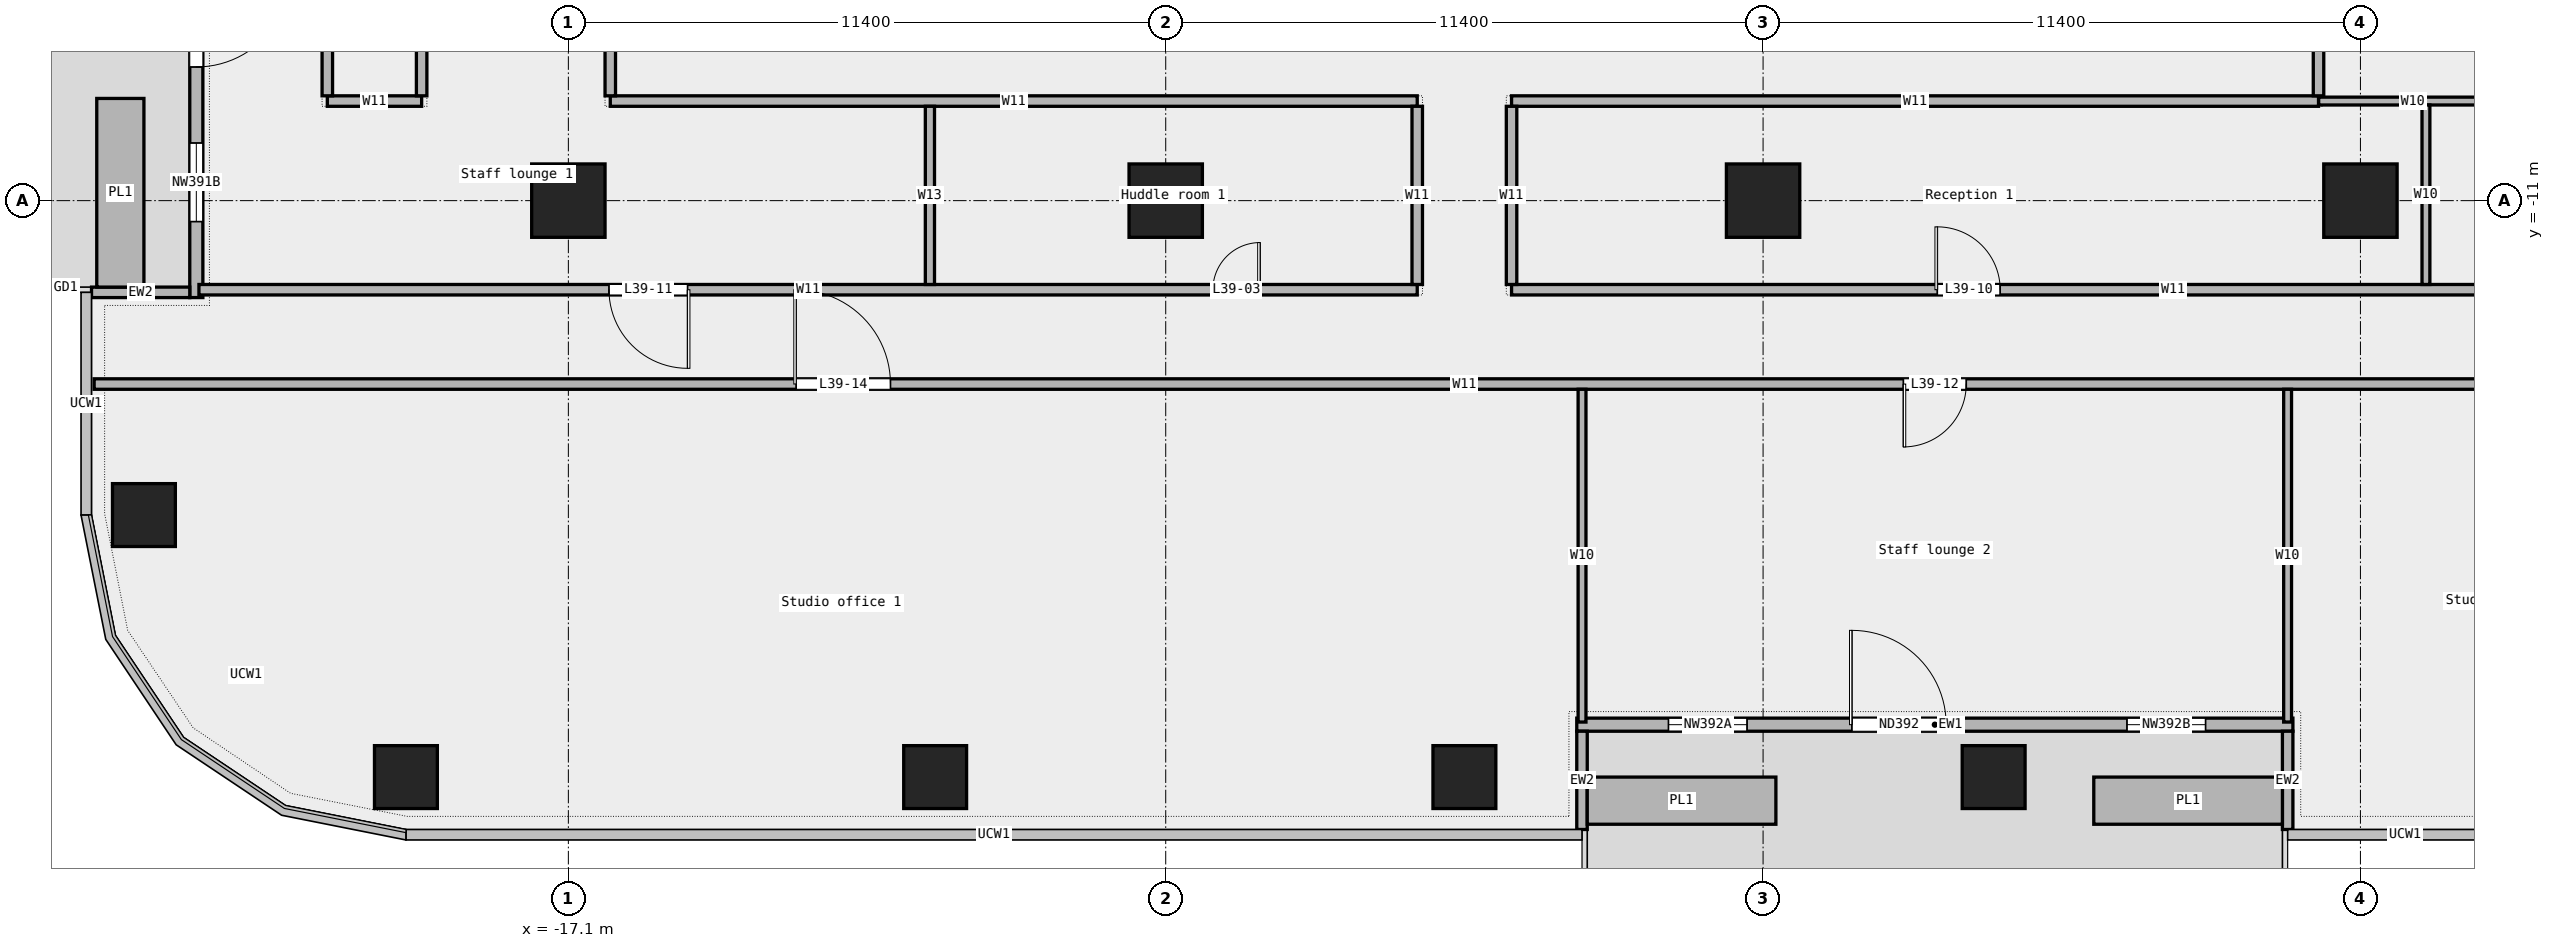
"""IFC4 building model, lengths in metres.
Left out: names, types, materials, properties, quantities, classifications, styles, units other than length and angle.
Written with IfcOpenShell. Run it as: python <this file> out.ifc"""

import sys

from ifc_helpers import new_model, si_unit, direction, frame, frame_2d, origin, origin_2d, place, context, subcontext, project, spatial, rectangle, extrude, element, fill, save


model = new_model("IFC4")
c1 = context("Model", 3, precision=1e-05, world=origin(), true_north=direction((0.0, 1.0)))
c2 = subcontext(c1, "Body", "Model", "MODEL_VIEW")
j1 = project(units=[si_unit("LENGTHUNIT", "METRE"), si_unit("PLANEANGLEUNIT", "RADIAN")], contexts=[c1])
p1 = place(None, origin())
s1 = spatial("IfcSite", under=j1, at=p1, CompositionType="ELEMENT")
p2 = place(p1, origin())
s2 = spatial("IfcBuilding", under=s1, at=p2, CompositionType="ELEMENT")
p3 = place(p2, frame((0.0, 0.0, 189.0)))
s3 = spatial("IfcBuildingStorey", under=s2, at=p3, CompositionType="ELEMENT", Elevation=189.0)
for number, where, z_axis, x_axis in (
    (1, (-20.2, -22.0, 0.0), (0.0, 0.0, 1.0), (1.0, 0.0, 0.0)),
    (2, (-10.1, -22.0, 0.0), (0.0, 0.0, 1.0), (1.0, 0.0, 0.0)),
    (3, (0.0, -22.0, 0.0), (0.0, 0.0, 1.0), (1.0, 0.0, 0.0)),
    (4, (10.1, -22.0, 0.0), (0.0, 0.0, 1.0), (1.0, 0.0, 0.0)),
    (5, (-25.2, -17.0, 0.0), (0.0, 0.0, 1.0), (1.0, 0.0, 0.0)),
):
    element("IfcColumn", number, at=place(p3, frame(where, z_axis=z_axis, x_axis=x_axis)), inside=s3, PredefinedType="COLUMN", context=c2, shape_type="SweptSolid", body=[
        extrude(rectangle(XDim=1.2, YDim=1.2, at=origin_2d()), origin(), (0.0, 0.0, 1.0), 3.6),
    ])
for number, where, z_axis, x_axis in (
    (6, (-17.1, -11.0, 0.0), (0.0, 0.0, 1.0), (1.0, 0.0, 0.0)),
    (7, (-5.7, -11.0, 0.0), (0.0, 0.0, 1.0), (1.0, 0.0, 0.0)),
    (8, (5.7, -11.0, 0.0), (0.0, 0.0, 1.0), (1.0, 0.0, 0.0)),
    (9, (17.1, -11.0, 0.0), (0.0, 0.0, 1.0), (1.0, 0.0, 0.0)),
):
    element("IfcColumn", number, at=place(p3, frame(where, z_axis=z_axis, x_axis=x_axis)), inside=s3, PredefinedType="COLUMN", context=c2, shape_type="SweptSolid", body=[
        extrude(rectangle(XDim=1.4, YDim=1.4, at=origin_2d()), origin(), (0.0, 0.0, 1.0), 3.6),
    ])
p4 = place(p3, frame((-24.2, 0.1, 0.0), z_axis=(0.0, 0.0, 1.0), x_axis=(0.0, -1.0, 0.0)))
e10 = element("IfcWall", 10, at=p4, inside=s3, PredefinedType="STANDARD", context=c2, shape_type="SweptSolid", body=[
    extrude(rectangle(XDim=12.95, YDim=0.25, at=frame_2d((6.475, 0.0))), origin(), (0.0, 0.0, 1.0), 3.6),
])
p5 = place(p4, frame((1.5, 0.0, 0.45)))
e11 = element("IfcOpeningElement", 11, at=p5, cuts=e10, PredefinedType="OPENING", context=c2, shape_type="SweptSolid", body=[
    extrude(rectangle(XDim=1.5, YDim=2.4, at=frame_2d((0.75, 1.2))), frame((0.0, 0.137, 0.0), z_axis=(0.0, -1.0, 0.0), x_axis=(1.0, 0.0, 0.0)), (0.0, 0.0, 1.0), 0.274),
])
p6 = place(p4, frame((6.75, 0.0, 0.0)))
e12 = element("IfcOpeningElement", 12, at=p6, cuts=e10, PredefinedType="OPENING", context=c2, shape_type="SweptSolid", body=[
    extrude(rectangle(XDim=1.8, YDim=2.4, at=frame_2d((0.9, 1.2))), frame((0.0, 0.137, 0.0), z_axis=(0.0, -1.0, 0.0), x_axis=(1.0, 0.0, 0.0)), (0.0, 0.0, 1.0), 0.274),
])
p7 = place(p4, frame((10.0, 0.0, 0.45)))
e13 = element("IfcOpeningElement", 13, at=p7, cuts=e10, PredefinedType="OPENING", context=c2, shape_type="SweptSolid", body=[
    extrude(rectangle(XDim=1.5, YDim=2.4, at=frame_2d((0.75, 1.2))), frame((0.0, 0.137, 0.0), z_axis=(0.0, -1.0, 0.0), x_axis=(1.0, 0.0, 0.0)), (0.0, 0.0, 1.0), 0.274),
])
p8 = place(p3, frame((-26.2, -12.75, 0.0), z_axis=(0.0, 0.0, 1.0), x_axis=(1.0, 0.0, 0.0)))
e14 = element("IfcWall", 14, at=p8, inside=s3, PredefinedType="STANDARD", context=c2, shape_type="SweptSolid", body=[
    extrude(rectangle(XDim=1.875, YDim=0.2, at=frame_2d((0.938, 0.0))), origin(), (0.0, 0.0, 1.0), 3.6),
])
p9 = place(p3, frame((-25.65, -9.05, 0.0), z_axis=(0.0, 0.0, 1.0), x_axis=(0.0, -1.0, 0.0)))
e15 = element("IfcWall", 15, at=p9, inside=s3, PredefinedType="STANDARD", context=c2, shape_type="SweptSolid", body=[
    extrude(rectangle(XDim=3.6, YDim=0.9, at=frame_2d((1.8, 0.0))), origin(), (0.0, 0.0, 1.0), 0.7),
])
p10 = place(p3, frame((2.145, -21.0, 0.0), z_axis=(0.0, 0.0, 1.0), x_axis=(1.0, 0.0, 0.0)))
e16 = element("IfcWall", 16, at=p10, inside=s3, PredefinedType="STANDARD", context=c2, shape_type="SweptSolid", body=[
    extrude(rectangle(XDim=13.667, YDim=0.25, at=frame_2d((6.833, 0.0))), origin(), (0.0, 0.0, 1.0), 3.6),
])
p11 = place(p10, frame((1.75, 0.0, 0.45)))
e17 = element("IfcOpeningElement", 17, at=p11, cuts=e16, PredefinedType="OPENING", context=c2, shape_type="SweptSolid", body=[
    extrude(rectangle(XDim=1.5, YDim=2.4, at=frame_2d((0.75, 1.2))), frame((0.0, 0.137, 0.0), z_axis=(0.0, -1.0, 0.0), x_axis=(1.0, 0.0, 0.0)), (0.0, 0.0, 1.0), 0.274),
])
p12 = place(p10, frame((5.25, 0.0, 0.0)))
e18 = element("IfcOpeningElement", 18, at=p12, cuts=e16, PredefinedType="OPENING", context=c2, shape_type="SweptSolid", body=[
    extrude(rectangle(XDim=1.8, YDim=2.4, at=frame_2d((0.9, 1.2))), frame((0.0, 0.137, 0.0), z_axis=(0.0, -1.0, 0.0), x_axis=(1.0, 0.0, 0.0)), (0.0, 0.0, 1.0), 0.274),
])
p13 = place(p10, frame((10.5, 0.0, 0.45)))
e19 = element("IfcOpeningElement", 19, at=p13, cuts=e16, PredefinedType="OPENING", context=c2, shape_type="SweptSolid", body=[
    extrude(rectangle(XDim=1.5, YDim=2.4, at=frame_2d((0.75, 1.2))), frame((0.0, 0.137, 0.0), z_axis=(0.0, -1.0, 0.0), x_axis=(1.0, 0.0, 0.0)), (0.0, 0.0, 1.0), 0.274),
])
for number, where, z_axis, x_axis in (
    (20, (2.244, -23.0, 0.0), (0.0, 0.0, 1.0), (0.0, 1.0, 0.0)),
    (21, (15.711, -23.0, 0.0), (0.0, 0.0, 1.0), (0.0, 1.0, 0.0)),
):
    element("IfcWall", number, at=place(p3, frame(where, z_axis=z_axis, x_axis=x_axis)), inside=s3, PredefinedType="STANDARD", context=c2, shape_type="SweptSolid", body=[
        extrude(rectangle(XDim=1.875, YDim=0.2, at=frame_2d((0.938, 0.0))), origin(), (0.0, 0.0, 1.0), 3.6),
    ])
for number, where, z_axis, x_axis in (
    (22, (2.344, -22.45, 0.0), (0.0, 0.0, 1.0), (1.0, 0.0, 0.0)),
    (23, (12.011, -22.45, 0.0), (0.0, 0.0, 1.0), (1.0, 0.0, 0.0)),
):
    element("IfcWall", number, at=place(p3, frame(where, z_axis=z_axis, x_axis=x_axis)), inside=s3, PredefinedType="STANDARD", context=c2, shape_type="SweptSolid", body=[
        extrude(rectangle(XDim=3.6, YDim=0.9, at=frame_2d((1.8, 0.0))), origin(), (0.0, 0.0, 1.0), 0.7),
    ])
p14 = place(p3, frame((-26.15, -14.5, 0.0), z_axis=(0.0, 0.0, 1.0), x_axis=(1.0, 0.0, 0.0)))
e24 = element("IfcWall", 24, at=p14, inside=s3, PredefinedType="PARTITIONING", context=c2, shape_type="SweptSolid", body=[
    extrude(rectangle(XDim=52.3, YDim=0.2, at=frame_2d((26.15, 0.0))), origin(), (0.0, 0.0, 1.0), 3.6),
])
p15 = place(p14, frame((34.528, 0.0, 0.0)))
e25 = element("IfcOpeningElement", 25, at=p15, cuts=e24, PredefinedType="OPENING", context=c2, shape_type="SweptSolid", body=[
    extrude(rectangle(XDim=1.2, YDim=2.1, at=frame_2d((0.6, 1.05))), frame((0.0, 0.112, 0.0), z_axis=(0.0, -1.0, 0.0), x_axis=(1.0, 0.0, 0.0)), (0.0, 0.0, 1.0), 0.224),
])
p16 = place(p14, frame((13.397, 0.0, 0.0)))
e26 = element("IfcOpeningElement", 26, at=p16, cuts=e24, PredefinedType="OPENING", context=c2, shape_type="SweptSolid", body=[
    extrude(rectangle(XDim=1.8, YDim=2.1, at=frame_2d((0.9, 1.05))), frame((0.0, 0.112, 0.0), z_axis=(0.0, -1.0, 0.0), x_axis=(1.0, 0.0, 0.0)), (0.0, 0.0, 1.0), 0.224),
])
p17 = place(p14, frame((46.38, 0.0, 0.0)))
e27 = element("IfcOpeningElement", 27, at=p17, cuts=e24, PredefinedType="OPENING", context=c2, shape_type="SweptSolid", body=[
    extrude(rectangle(XDim=1.2, YDim=2.1, at=frame_2d((0.6, 1.05))), frame((0.0, 0.112, 0.0), z_axis=(0.0, -1.0, 0.0), x_axis=(1.0, 0.0, 0.0)), (0.0, 0.0, 1.0), 0.224),
])
p18 = place(p3, frame((-24.15, -12.7, 0.0), z_axis=(0.0, 0.0, 1.0), x_axis=(1.0, 0.0, 0.0)))
e28 = element("IfcWall", 28, at=p18, inside=s3, PredefinedType="PARTITIONING", context=c2, shape_type="SweptSolid", body=[
    extrude(rectangle(XDim=23.25, YDim=0.2, at=frame_2d((11.625, 0.0))), origin(), (0.0, 0.0, 1.0), 3.6),
])
p19 = place(p18, frame((19.35, 0.0, 0.0)))
e29 = element("IfcOpeningElement", 29, at=p19, cuts=e28, PredefinedType="OPENING", context=c2, shape_type="SweptSolid", body=[
    extrude(rectangle(XDim=0.9, YDim=2.1, at=frame_2d((0.45, 1.05))), frame((0.0, 0.112, 0.0), z_axis=(0.0, -1.0, 0.0), x_axis=(1.0, 0.0, 0.0)), (0.0, 0.0, 1.0), 0.224),
])
p20 = place(p18, frame((7.825, 0.0, 0.0)))
e30 = element("IfcOpeningElement", 30, at=p20, cuts=e28, PredefinedType="OPENING", context=c2, shape_type="SweptSolid", body=[
    extrude(rectangle(XDim=1.5, YDim=2.1, at=frame_2d((0.75, 1.05))), frame((0.0, 0.112, 0.0), z_axis=(0.0, -1.0, 0.0), x_axis=(1.0, 0.0, 0.0)), (0.0, 0.0, 1.0), 0.224),
])
p21 = place(p3, frame((0.9, -12.7, 0.0), z_axis=(0.0, 0.0, 1.0), x_axis=(1.0, 0.0, 0.0)))
e31 = element("IfcWall", 31, at=p21, inside=s3, PredefinedType="PARTITIONING", context=c2, shape_type="SweptSolid", body=[
    extrude(rectangle(XDim=25.25, YDim=0.2, at=frame_2d((12.625, 0.0))), origin(), (0.0, 0.0, 1.0), 3.6),
])
p22 = place(p21, frame((20.75, 0.0, 0.0)))
e32 = element("IfcOpeningElement", 32, at=p22, cuts=e31, PredefinedType="OPENING", context=c2, shape_type="SweptSolid", body=[
    extrude(rectangle(XDim=1.0, YDim=2.1, at=frame_2d((0.5, 1.05))), frame((0.0, 0.112, 0.0), z_axis=(0.0, -1.0, 0.0), x_axis=(1.0, 0.0, 0.0)), (0.0, 0.0, 1.0), 0.224),
])
p23 = place(p21, frame((8.125, 0.0, 0.0)))
e33 = element("IfcOpeningElement", 33, at=p23, cuts=e31, PredefinedType="OPENING", context=c2, shape_type="SweptSolid", body=[
    extrude(rectangle(XDim=1.2, YDim=2.1, at=frame_2d((0.6, 1.05))), frame((0.0, 0.112, 0.0), z_axis=(0.0, -1.0, 0.0), x_axis=(1.0, 0.0, 0.0)), (0.0, 0.0, 1.0), 0.224),
])
p24 = place(p3, frame((16.3, -9.1, 0.0), z_axis=(0.0, 0.0, 1.0), x_axis=(1.0, 0.0, 0.0)))
e34 = element("IfcWall", 34, at=p24, inside=s3, PredefinedType="PARTITIONING", context=c2, shape_type="SweptSolid", body=[
    extrude(rectangle(XDim=3.6, YDim=0.15, at=frame_2d((1.8, 0.0))), origin(), (0.0, 0.0, 1.0), 3.6),
])
p25 = place(p3, frame((-21.7, -9.1, 0.0), z_axis=(0.0, 0.0, 1.0), x_axis=(1.0, 0.0, 0.0)))
e35 = element("IfcWall", 35, at=p25, inside=s3, PredefinedType="PARTITIONING", context=c2, shape_type="SweptSolid", body=[
    extrude(rectangle(XDim=1.8, YDim=0.2, at=frame_2d((0.9, 0.0))), origin(), (0.0, 0.0, 1.0), 3.6),
])
for number, where, z_axis, x_axis in (
    (36, (-16.3, -9.1, 0.0), (0.0, 0.0, 1.0), (1.0, 0.0, 0.0)),
    (37, (0.9, -9.1, 0.0), (0.0, 0.0, 1.0), (1.0, 0.0, 0.0)),
):
    element("IfcWall", number, at=place(p3, frame(where, z_axis=z_axis, x_axis=x_axis)), inside=s3, PredefinedType="PARTITIONING", context=c2, shape_type="SweptSolid", body=[
        extrude(rectangle(XDim=15.4, YDim=0.2, at=frame_2d((7.7, 0.0))), origin(), (0.0, 0.0, 1.0), 3.6),
    ])
p26 = place(p3, frame((-21.7, -9.0, 0.0), z_axis=(0.0, 0.0, 1.0), x_axis=(0.0, 1.0, 0.0)))
e38 = element("IfcWall", 38, at=p26, inside=s3, PredefinedType="PARTITIONING", context=c2, shape_type="SweptSolid", body=[
    extrude(rectangle(XDim=24.3, YDim=0.2, at=frame_2d((12.15, 0.0))), origin(), (0.0, 0.0, 1.0), 3.6),
])
p27 = place(p26, frame((16.05, 0.0, 0.0)))
e39 = element("IfcOpeningElement", 39, at=p27, cuts=e38, PredefinedType="OPENING", context=c2, shape_type="SweptSolid", body=[
    extrude(rectangle(XDim=1.2, YDim=2.1, at=frame_2d((0.6, 1.05))), frame((0.0, 0.112, 0.0), z_axis=(0.0, -1.0, 0.0), x_axis=(1.0, 0.0, 0.0)), (0.0, 0.0, 1.0), 0.224),
])
for number, where, z_axis, x_axis in (
    (40, (-19.9, -9.0, 0.0), (0.0, 0.0, 1.0), (0.0, 1.0, 0.0)),
    (41, (-16.3, -9.0, 0.0), (0.0, 0.0, 1.0), (0.0, 1.0, 0.0)),
):
    element("IfcWall", number, at=place(p3, frame(where, z_axis=z_axis, x_axis=x_axis)), inside=s3, PredefinedType="PARTITIONING", context=c2, shape_type="SweptSolid", body=[
        extrude(rectangle(XDim=6.25, YDim=0.2, at=frame_2d((3.125, 0.0))), origin(), (0.0, 0.0, 1.0), 3.6),
    ])
p28 = place(p3, frame((-10.2, -12.6, 0.0), z_axis=(0.0, 0.0, 1.0), x_axis=(0.0, 1.0, 0.0)))
e42 = element("IfcWall", 42, at=p28, inside=s3, PredefinedType="PARTITIONING", context=c2, shape_type="SweptSolid", body=[
    extrude(rectangle(XDim=3.4, YDim=0.175, at=frame_2d((1.7, 0.0))), origin(), (0.0, 0.0, 1.0), 3.6),
])
for number, where, z_axis, x_axis in (
    (43, (-0.9, -12.6, 0.0), (0.0, 0.0, 1.0), (0.0, 1.0, 0.0)),
    (44, (0.9, -12.6, 0.0), (0.0, 0.0, 1.0), (0.0, 1.0, 0.0)),
):
    element("IfcWall", number, at=place(p3, frame(where, z_axis=z_axis, x_axis=x_axis)), inside=s3, PredefinedType="PARTITIONING", context=c2, shape_type="SweptSolid", body=[
        extrude(rectangle(XDim=3.4, YDim=0.2, at=frame_2d((1.7, 0.0))), origin(), (0.0, 0.0, 1.0), 3.6),
    ])
for number, where, z_axis, x_axis in (
    (45, (2.245, -20.95, 0.0), (0.0, 0.0, 1.0), (0.0, 1.0, 0.0)),
    (46, (15.71, -20.95, 0.0), (0.0, 0.0, 1.0), (0.0, 1.0, 0.0)),
):
    element("IfcWall", number, at=place(p3, frame(where, z_axis=z_axis, x_axis=x_axis)), inside=s3, PredefinedType="PARTITIONING", context=c2, shape_type="SweptSolid", body=[
        extrude(rectangle(XDim=6.35, YDim=0.15, at=frame_2d((3.175, 0.0))), origin(), (0.0, 0.0, 1.0), 3.6),
    ])
p29 = place(p3, frame((16.3, -9.0, 0.0), z_axis=(0.0, 0.0, 1.0), x_axis=(0.0, 1.0, 0.0)))
e47 = element("IfcWall", 47, at=p29, inside=s3, PredefinedType="PARTITIONING", context=c2, shape_type="SweptSolid", body=[
    extrude(rectangle(XDim=8.3, YDim=0.2, at=frame_2d((4.15, 0.0))), origin(), (0.0, 0.0, 1.0), 3.6),
])
p30 = place(p3, frame((18.35, -12.6, 0.0), z_axis=(0.0, 0.0, 1.0), x_axis=(0.0, 1.0, 0.0)))
e48 = element("IfcWall", 48, at=p30, inside=s3, PredefinedType="PARTITIONING", context=c2, shape_type="SweptSolid", body=[
    extrude(rectangle(XDim=3.425, YDim=0.15, at=frame_2d((1.712, 0.0))), origin(), (0.0, 0.0, 1.0), 3.6),
])
p31 = place(p6, origin())
e49 = element("IfcDoor", 49, at=p31, inside=s3, OperationType="DOUBLE_DOOR_SINGLE_SWING", PredefinedType="DOOR", context=c2, shape_type="SweptSolid", body=[
    extrude(rectangle(XDim=1.8, YDim=2.4, at=frame_2d((0.9, 1.2))), frame((0.0, 0.025, 0.0), z_axis=(0.0, -1.0, 0.0), x_axis=(1.0, 0.0, 0.0)), (0.0, 0.0, 1.0), 0.05),
])
fill(e12, e49)
p32 = place(p7, origin())
e50 = element("IfcWindow", 50, at=p32, inside=s3, PartitioningType="SINGLE_PANEL", PredefinedType="WINDOW", context=c2, shape_type="SweptSolid", body=[
    extrude(rectangle(XDim=1.5, YDim=2.4, at=frame_2d((0.75, 1.2))), frame((0.0, 0.03, 0.0), z_axis=(0.0, -1.0, 0.0), x_axis=(1.0, 0.0, 0.0)), (0.0, 0.0, 1.0), 0.06),
])
fill(e13, e50)
p33 = place(p11, origin())
e51 = element("IfcWindow", 51, at=p33, inside=s3, PartitioningType="SINGLE_PANEL", PredefinedType="WINDOW", context=c2, shape_type="SweptSolid", body=[
    extrude(rectangle(XDim=1.5, YDim=2.4, at=frame_2d((0.75, 1.2))), frame((0.0, 0.03, 0.0), z_axis=(0.0, -1.0, 0.0), x_axis=(1.0, 0.0, 0.0)), (0.0, 0.0, 1.0), 0.06),
])
fill(e17, e51)
p34 = place(p12, origin())
e52 = element("IfcDoor", 52, at=p34, inside=s3, OperationType="DOUBLE_DOOR_SINGLE_SWING", PredefinedType="DOOR", context=c2, shape_type="SweptSolid", body=[
    extrude(rectangle(XDim=1.8, YDim=2.4, at=frame_2d((0.9, 1.2))), frame((0.0, 0.025, 0.0), z_axis=(0.0, -1.0, 0.0), x_axis=(1.0, 0.0, 0.0)), (0.0, 0.0, 1.0), 0.05),
])
fill(e18, e52)
p35 = place(p13, origin())
e53 = element("IfcWindow", 53, at=p35, inside=s3, PartitioningType="SINGLE_PANEL", PredefinedType="WINDOW", context=c2, shape_type="SweptSolid", body=[
    extrude(rectangle(XDim=1.5, YDim=2.4, at=frame_2d((0.75, 1.2))), frame((0.0, 0.03, 0.0), z_axis=(0.0, -1.0, 0.0), x_axis=(1.0, 0.0, 0.0)), (0.0, 0.0, 1.0), 0.06),
])
fill(e19, e53)
p36 = place(p19, origin())
e54 = element("IfcDoor", 54, at=p36, inside=s3, OperationType="SINGLE_SWING_RIGHT", PredefinedType="DOOR", context=c2, shape_type="SweptSolid", body=[
    extrude(rectangle(XDim=0.9, YDim=2.1, at=frame_2d((0.45, 1.05))), frame((0.0, 0.025, 0.0), z_axis=(0.0, -1.0, 0.0), x_axis=(1.0, 0.0, 0.0)), (0.0, 0.0, 1.0), 0.05),
])
fill(e29, e54)
p37 = place(p23, origin())
e55 = element("IfcDoor", 55, at=p37, inside=s3, OperationType="SINGLE_SWING_LEFT", PredefinedType="DOOR", context=c2, shape_type="SweptSolid", body=[
    extrude(rectangle(XDim=1.2, YDim=2.1, at=frame_2d((0.6, 1.05))), frame((0.0, 0.025, 0.0), z_axis=(0.0, -1.0, 0.0), x_axis=(1.0, 0.0, 0.0)), (0.0, 0.0, 1.0), 0.05),
])
fill(e33, e55)
p38 = place(p20, origin())
e56 = element("IfcDoor", 56, at=p38, inside=s3, OperationType="DOUBLE_DOOR_SINGLE_SWING", PredefinedType="DOOR", context=c2, shape_type="SweptSolid", body=[
    extrude(rectangle(XDim=1.5, YDim=2.1, at=frame_2d((0.75, 1.05))), frame((0.0, 0.025, 0.0), z_axis=(0.0, -1.0, 0.0), x_axis=(1.0, 0.0, 0.0)), (0.0, 0.0, 1.0), 0.05),
])
fill(e30, e56)
p39 = place(p15, origin())
e57 = element("IfcDoor", 57, at=p39, inside=s3, OperationType="SINGLE_SWING_RIGHT", PredefinedType="DOOR", context=c2, shape_type="SweptSolid", body=[
    extrude(rectangle(XDim=1.2, YDim=2.1, at=frame_2d((0.6, 1.05))), frame((0.0, 0.025, 0.0), z_axis=(0.0, -1.0, 0.0), x_axis=(1.0, 0.0, 0.0)), (0.0, 0.0, 1.0), 0.05),
])
fill(e25, e57)
p40 = place(p16, origin())
e58 = element("IfcDoor", 58, at=p40, inside=s3, OperationType="DOUBLE_DOOR_SINGLE_SWING", PredefinedType="DOOR", context=c2, shape_type="SweptSolid", body=[
    extrude(rectangle(XDim=1.8, YDim=2.1, at=frame_2d((0.9, 1.05))), frame((0.0, 0.025, 0.0), z_axis=(0.0, -1.0, 0.0), x_axis=(1.0, 0.0, 0.0)), (0.0, 0.0, 1.0), 0.05),
])
fill(e26, e58)
save(model, sys.argv[1])
